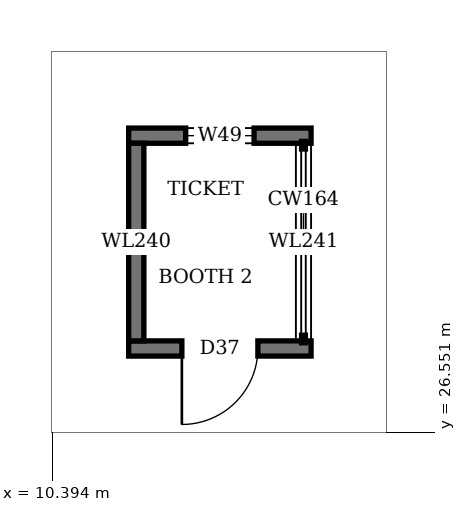
"""IFC4 building model, lengths in metres.
Left out: names, types, materials, properties, quantities, classifications, styles, units other than length and angle.
Written with IfcOpenShell. Run it as: python <this file> out.ifc"""

import sys

from ifc_helpers import new_model, si_unit, direction, frame, frame_2d, origin, place, context, subcontext, project, spatial, rectangle, extrude, element, fill, save


model = new_model("IFC4")
c1 = context("Model", 3, precision=1e-05, world=origin(), true_north=direction((0.0, 1.0)))
c2 = subcontext(c1, "Body", "Model", "MODEL_VIEW")
j1 = project(units=[si_unit("LENGTHUNIT", "METRE"), si_unit("PLANEANGLEUNIT", "RADIAN")], contexts=[c1])
p1 = place(None, origin())
s1 = spatial("IfcSite", under=j1, at=p1, CompositionType="ELEMENT")
p2 = place(p1, origin())
s2 = spatial("IfcBuilding", under=s1, at=p2, CompositionType="ELEMENT")
p3 = place(p2, origin())
s3 = spatial("IfcBuildingStorey", under=s2, at=p3, CompositionType="ELEMENT", Elevation=0.0)
p4 = place(p3, frame((11.4, 27.65, 0.0), z_axis=(0.0, 0.0, 1.0), x_axis=(1.0, 0.0, 0.0)))
e1 = element("IfcWall", 1, at=p4, inside=s3, PredefinedType="SOLIDWALL", context=c2, shape_type="SweptSolid", body=[
    extrude(rectangle(XDim=2.4, YDim=0.2, at=frame_2d((1.2, 0.0))), origin(), (0.0, 0.0, 1.0), 2.65),
])
p5 = place(p4, frame((0.7, 0.0, 0.0)))
e2 = element("IfcOpeningElement", 2, at=p5, cuts=e1, PredefinedType="OPENING", context=c2, shape_type="SweptSolid", body=[
    extrude(rectangle(XDim=1.0, YDim=2.1, at=frame_2d((0.5, 1.05))), frame((0.0, 0.11, 0.0), z_axis=(0.0, -1.0, 0.0), x_axis=(1.0, 0.0, 0.0)), (0.0, 0.0, 1.0), 0.22),
])
p6 = place(p3, frame((11.4, 30.45, 0.0), z_axis=(0.0, 0.0, 1.0), x_axis=(1.0, 0.0, 0.0)))
e3 = element("IfcWall", 3, at=p6, inside=s3, PredefinedType="SOLIDWALL", context=c2, shape_type="SweptSolid", body=[
    extrude(rectangle(XDim=2.4, YDim=0.2, at=frame_2d((1.2, 0.0))), origin(), (0.0, 0.0, 1.0), 2.65),
])
p7 = place(p6, frame((0.75, 0.0, 0.9)))
e4 = element("IfcOpeningElement", 4, at=p7, cuts=e3, PredefinedType="OPENING", context=c2, shape_type="SweptSolid", body=[
    extrude(rectangle(XDim=0.9, YDim=1.2, at=frame_2d((0.45, 0.6))), frame((0.0, 0.11, 0.0), z_axis=(0.0, -1.0, 0.0), x_axis=(1.0, 0.0, 0.0)), (0.0, 0.0, 1.0), 0.22),
])
p8 = place(p3, frame((11.5, 27.75, 0.0), z_axis=(0.0, 0.0, 1.0), x_axis=(0.0, 1.0, 0.0)))
e5 = element("IfcWall", 5, at=p8, inside=s3, PredefinedType="SOLIDWALL", context=c2, shape_type="SweptSolid", body=[
    extrude(rectangle(XDim=2.6, YDim=0.2, at=frame_2d((1.3, 0.0))), origin(), (0.0, 0.0, 1.0), 2.65),
])
p9 = place(p3, frame((13.7, 27.75, 0.0), z_axis=(0.0, 0.0, 1.0), x_axis=(0.0, 1.0, 0.0)))
e6 = element("IfcWall", 6, at=p9, inside=s3, PredefinedType="SOLIDWALL", context=c2, shape_type="SweptSolid", body=[
    extrude(rectangle(XDim=2.6, YDim=0.2, at=frame_2d((1.3, 0.0))), origin(), (0.0, 0.0, 1.0), 1.0),
])
p10 = place(p5, frame((1.0, 0.0, 0.0), z_axis=(0.0, 0.0, 1.0), x_axis=(-1.0, 0.0, 0.0)))
e7 = element("IfcDoor", 7, at=p10, inside=s3, OperationType="SINGLE_SWING_RIGHT", PredefinedType="DOOR", context=c2, shape_type="SweptSolid", body=[
    extrude(rectangle(XDim=1.0, YDim=2.1, at=frame_2d((0.5, 1.05))), frame((0.0, 0.025, 0.0), z_axis=(0.0, -1.0, 0.0), x_axis=(1.0, 0.0, 0.0)), (0.0, 0.0, 1.0), 0.05),
])
fill(e2, e7)
p11 = place(p7, origin())
e8 = element("IfcWindow", 8, at=p11, inside=s3, PartitioningType="SINGLE_PANEL", PredefinedType="WINDOW", context=c2, shape_type="SweptSolid", body=[
    extrude(rectangle(XDim=0.9, YDim=1.2, at=frame_2d((0.45, 0.6))), frame((0.0, 0.03, 0.0), z_axis=(0.0, -1.0, 0.0), x_axis=(1.0, 0.0, 0.0)), (0.0, 0.0, 1.0), 0.06),
])
fill(e4, e8)
save(model, sys.argv[1])
